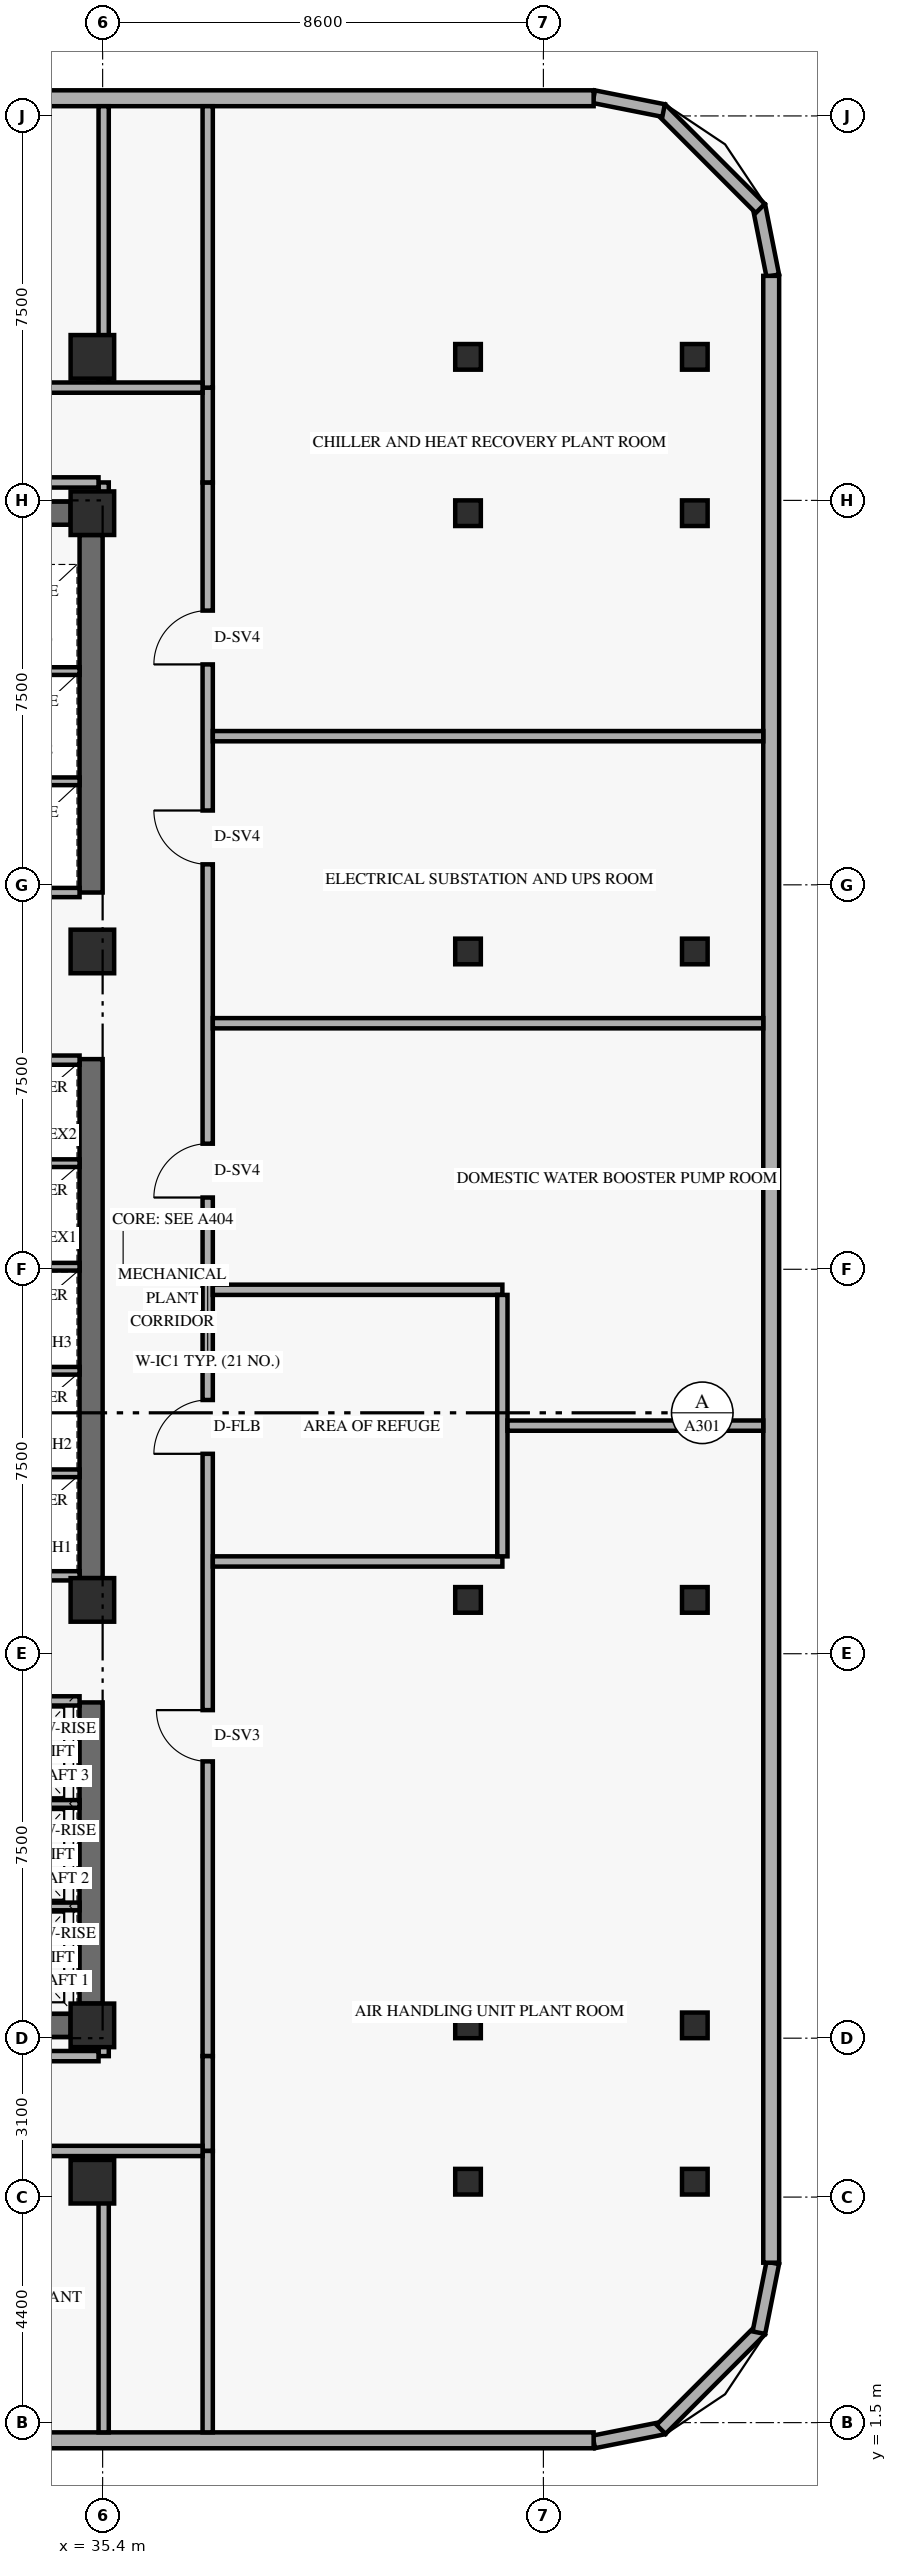
"""IFC4 building model, lengths in metres.
Left out: names, types, materials, properties, quantities, classifications, styles, units other than length and angle.
Written with IfcOpenShell. Run it as: python <this file> out.ifc"""

import sys

from ifc_helpers import new_model, si_unit, direction, frame, frame_2d, origin, origin_2d, place, context, subcontext, project, spatial, rectangle, hollow_rectangle, extrude, element, fill, save


model = new_model("IFC4")
c1 = context("Model", 3, precision=1e-05, world=origin(), true_north=direction((0.0, 1.0)))
c2 = subcontext(c1, "Body", "Model", "MODEL_VIEW")
j1 = project(units=[si_unit("LENGTHUNIT", "METRE"), si_unit("PLANEANGLEUNIT", "RADIAN")], contexts=[c1])
p1 = place(None, origin())
s1 = spatial("IfcSite", under=j1, at=p1, CompositionType="ELEMENT")
p2 = place(p1, origin())
s2 = spatial("IfcBuilding", under=s1, at=p2, CompositionType="ELEMENT")
p3 = place(p2, frame((0.0, 0.0, 71.4)))
s3 = spatial("IfcBuildingStorey", under=s2, at=p3, CompositionType="ELEMENT", Elevation=71.4)
p4 = place(p3, frame((35.175, 9.675, 0.0), z_axis=(0.0, 0.0, 1.0), x_axis=(0.0, 1.0, 0.0)))
e1 = element("IfcWall", 1, at=p4, inside=s3, PredefinedType="SHEAR", context=c2, shape_type="SweptSolid", body=[
    extrude(rectangle(XDim=5.875, YDim=0.45, at=frame_2d((2.938, 0.0))), origin(), (0.0, 0.0, 1.0), 4.297),
])
p5 = place(p3, frame((35.175, 17.975, 0.0), z_axis=(0.0, 0.0, 1.0), x_axis=(0.0, 1.0, 0.0)))
e2 = element("IfcWall", 2, at=p5, inside=s3, PredefinedType="SHEAR", context=c2, shape_type="SweptSolid", body=[
    extrude(rectangle(XDim=10.125, YDim=0.45, at=frame_2d((5.062, 0.0))), origin(), (0.0, 0.0, 1.0), 4.297),
])
p6 = place(p3, frame((35.175, 31.35, 0.0), z_axis=(0.0, 0.0, 1.0), x_axis=(0.0, 1.0, 0.0)))
e3 = element("IfcWall", 3, at=p6, inside=s3, PredefinedType="SHEAR", context=c2, shape_type="SweptSolid", body=[
    extrude(rectangle(XDim=6.975, YDim=0.45, at=frame_2d((3.487, 0.0))), origin(), (0.0, 0.0, 1.0), 4.297),
])
for number, where, z_axis, x_axis in (
    (4, (24.625, 9.25, 0.0), (0.0, 0.0, 1.0), (1.0, 0.0, 0.0)),
    (5, (24.625, 38.75, 0.0), (0.0, 0.0, 1.0), (1.0, 0.0, 0.0)),
):
    element("IfcWall", number, at=place(p3, frame(where, z_axis=z_axis, x_axis=x_axis)), inside=s3, PredefinedType="SHEAR", context=c2, shape_type="SweptSolid", body=[
        extrude(rectangle(XDim=10.15, YDim=0.45, at=frame_2d((5.075, 0.0))), origin(), (0.0, 0.0, 1.0), 4.99),
    ])
for number, where, z_axis, x_axis in (
    (6, (35.2, 6.2, 0.0), (0.0, 0.0, 1.0), (1.0, 0.0, 0.0)),
    (7, (35.2, 9.25, 0.0), (0.0, 0.0, 1.0), (1.0, 0.0, 0.0)),
    (8, (35.2, 17.55, 0.0), (0.0, 0.0, 1.0), (1.0, 0.0, 0.0)),
    (9, (35.2, 30.2, 0.0), (0.0, 0.0, 1.0), (1.0, 0.0, 0.0)),
    (10, (35.2, 38.75, 0.0), (0.0, 0.0, 1.0), (1.0, 0.0, 0.0)),
    (11, (35.2, 41.8, 0.0), (0.0, 0.0, 1.0), (1.0, 0.0, 0.0)),
):
    element("IfcColumn", number, at=place(p3, frame(where, z_axis=z_axis, x_axis=x_axis)), inside=s3, PredefinedType="COLUMN", context=c2, shape_type="SweptSolid", body=[
        extrude(rectangle(XDim=0.85, YDim=0.85, at=origin_2d()), origin(), (0.0, 0.0, 1.0), 5.4),
    ])
for number, where, z_axis, x_axis in (
    (12, (42.435, 6.2, 0.0), (0.035, 0.0, 0.999), (0.0, 1.0, 0.0)),
    (13, (42.435, 9.25, 0.0), (0.035, 0.0, 0.999), (0.0, 1.0, 0.0)),
    (14, (42.435, 17.55, 0.0), (0.035, 0.0, 0.999), (0.0, 1.0, 0.0)),
    (15, (42.435, 30.2, 0.0), (0.035, 0.0, 0.999), (0.0, 1.0, 0.0)),
    (16, (42.435, 38.75, 0.0), (0.035, 0.0, 0.999), (0.0, 1.0, 0.0)),
    (17, (42.435, 41.8, 0.0), (0.035, 0.0, 0.999), (0.0, 1.0, 0.0)),
):
    element("IfcColumn", number, at=place(p3, frame(where, z_axis=z_axis, x_axis=x_axis)), inside=s3, PredefinedType="COLUMN", context=c2, shape_type="SweptSolid", body=[
        extrude(hollow_rectangle(XDim=0.5, YDim=0.5, WallThickness=0.022, at=origin_2d()), origin(), (0.0, 0.0, 1.0), 5.404),
    ])
for number, where, z_axis, x_axis in (
    (18, (46.798, 6.2, 0.0), (0.058, 0.0, 0.998), (0.0, 1.0, 0.0)),
    (19, (46.798, 9.25, 0.0), (0.058, 0.0, 0.998), (0.0, 1.0, 0.0)),
    (20, (46.798, 17.55, 0.0), (0.058, 0.0, 0.998), (0.0, 1.0, 0.0)),
    (21, (46.798, 30.2, 0.0), (0.058, 0.0, 0.998), (0.0, 1.0, 0.0)),
    (22, (46.798, 38.75, 0.0), (0.058, 0.0, 0.998), (0.0, 1.0, 0.0)),
    (23, (46.798, 41.8, 0.0), (0.058, 0.0, 0.998), (0.0, 1.0, 0.0)),
):
    element("IfcColumn", number, at=place(p3, frame(where, z_axis=z_axis, x_axis=x_axis)), inside=s3, PredefinedType="COLUMN", context=c2, shape_type="SweptSolid", body=[
        extrude(hollow_rectangle(XDim=0.5, YDim=0.5, WallThickness=0.022, at=origin_2d()), origin(), (0.0, 0.0, 1.0), 5.409),
    ])
p7 = place(p3, frame((44.983, 1.124, 0.0), z_axis=(0.0, 0.0, 1.0), x_axis=(0.980809899341, 0.19496651342, 0.0)))
e24 = element("IfcWall", 24, at=p7, inside=s3, PredefinedType="SOLIDWALL", context=c2, shape_type="SweptSolid", body=[
    extrude(rectangle(XDim=1.389, YDim=0.25, at=frame_2d((0.694, 0.0))), origin(), (0.0, 0.0, 1.0), 4.99),
])
p8 = place(p3, frame((46.295, 1.368, 0.0), z_axis=(0.0, 0.0, 1.0), x_axis=(0.707106781187, 0.707106781187, 0.0)))
e25 = element("IfcWall", 25, at=p8, inside=s3, PredefinedType="SOLIDWALL", context=c2, shape_type="SweptSolid", body=[
    extrude(rectangle(XDim=2.739, YDim=0.25, at=frame_2d((1.37, 0.0))), origin(), (0.0, 0.0, 1.0), 4.99),
])
for number, where, z_axis, x_axis in (
    (26, (48.205, 3.254, 0.0), (0.0, 0.0, 1.0), (0.195, 0.981, 0.0)),
    (27, (48.476, 43.384, 0.0), (0.0, 0.0, 1.0), (-0.195, 0.981, 0.0)),
):
    element("IfcWall", number, at=place(p3, frame(where, z_axis=z_axis, x_axis=x_axis)), inside=s3, PredefinedType="SOLIDWALL", context=c2, shape_type="SweptSolid", body=[
        extrude(rectangle(XDim=1.389, YDim=0.25, at=frame_2d((0.694, 0.0))), origin(), (0.0, 0.0, 1.0), 4.99),
    ])
p9 = place(p3, frame((48.232, 44.695, 0.0), z_axis=(0.0, 0.0, 1.0), x_axis=(-0.707106781187, 0.707106781187, 0.0)))
e28 = element("IfcWall", 28, at=p9, inside=s3, PredefinedType="SOLIDWALL", context=c2, shape_type="SweptSolid", body=[
    extrude(rectangle(XDim=2.739, YDim=0.25, at=frame_2d((1.37, 0.0))), origin(), (0.0, 0.0, 1.0), 4.99),
])
p10 = place(p3, frame((46.345, 46.605, 0.0), z_axis=(0.0, 0.0, 1.0), x_axis=(-0.980809899341, 0.19496651342, 0.0)))
e29 = element("IfcWall", 29, at=p10, inside=s3, PredefinedType="SOLIDWALL", context=c2, shape_type="SweptSolid", body=[
    extrude(rectangle(XDim=1.389, YDim=0.25, at=frame_2d((0.694, 0.0))), origin(), (0.0, 0.0, 1.0), 4.99),
])
p11 = place(p3, frame((5.42, 1.155, 0.0), z_axis=(0.0, 0.0, 1.0), x_axis=(1.0, 0.0, 0.0)))
e30 = element("IfcWall", 30, at=p11, inside=s3, PredefinedType="SOLIDWALL", context=c2, shape_type="SweptSolid", body=[
    extrude(rectangle(XDim=39.56, YDim=0.31, at=frame_2d((19.78, 0.0))), origin(), (0.0, 0.0, 1.0), 4.99),
])
p12 = place(p3, frame((48.445, 4.62, 0.0), z_axis=(0.0, 0.0, 1.0), x_axis=(0.0, 1.0, 0.0)))
e31 = element("IfcWall", 31, at=p12, inside=s3, PredefinedType="SOLIDWALL", context=c2, shape_type="SweptSolid", body=[
    extrude(rectangle(XDim=38.76, YDim=0.31, at=frame_2d((19.38, 0.0))), origin(), (0.0, 0.0, 1.0), 4.99),
])
p13 = place(p3, frame((44.98, 46.845, 0.0), z_axis=(0.0, 0.0, 1.0), x_axis=(-1.0, 0.0, 0.0)))
e32 = element("IfcWall", 32, at=p13, inside=s3, PredefinedType="SOLIDWALL", context=c2, shape_type="SweptSolid", body=[
    extrude(rectangle(XDim=39.56, YDim=0.31, at=frame_2d((19.78, 0.0))), origin(), (0.0, 0.0, 1.0), 4.99),
])
p14 = place(p3, frame((32.74, 15.58, 0.0), z_axis=(0.0, 0.0, 1.0), x_axis=(1.0, 0.0, 0.0)))
e33 = element("IfcWall", 33, at=p14, inside=s3, PredefinedType="STANDARD", context=c2, shape_type="SweptSolid", body=[
    extrude(rectangle(XDim=2.21, YDim=0.18, at=frame_2d((1.105, 0.0))), origin(), (0.0, 0.0, 1.0), 4.99),
])
for number, where, z_axis, x_axis in (
    (34, (32.74, 11.57, 0.0), (0.0, 0.0, 1.0), (1.0, 0.0, 0.0)),
    (35, (32.74, 13.57, 0.0), (0.0, 0.0, 1.0), (1.0, 0.0, 0.0)),
):
    element("IfcWall", number, at=place(p3, frame(where, z_axis=z_axis, x_axis=x_axis)), inside=s3, PredefinedType="STANDARD", context=c2, shape_type="SweptSolid", body=[
        extrude(rectangle(XDim=2.21, YDim=0.15, at=frame_2d((1.105, 0.0))), origin(), (0.0, 0.0, 1.0), 4.99),
    ])
for number, where, z_axis, x_axis in (
    (36, (32.74, 18.02, 0.0), (0.0, 0.0, 1.0), (1.0, 0.0, 0.0)),
    (37, (32.74, 28.08, 0.0), (0.0, 0.0, 1.0), (1.0, 0.0, 0.0)),
):
    element("IfcWall", number, at=place(p3, frame(where, z_axis=z_axis, x_axis=x_axis)), inside=s3, PredefinedType="STANDARD", context=c2, shape_type="SweptSolid", body=[
        extrude(rectangle(XDim=2.21, YDim=0.18, at=frame_2d((1.105, 0.0))), origin(), (0.0, 0.0, 1.0), 4.99),
    ])
for number, where, z_axis, x_axis in (
    (38, (32.74, 20.02, 0.0), (0.0, 0.0, 1.0), (1.0, 0.0, 0.0)),
    (39, (32.74, 22.02, 0.0), (0.0, 0.0, 1.0), (1.0, 0.0, 0.0)),
    (40, (32.74, 24.05, 0.0), (0.0, 0.0, 1.0), (1.0, 0.0, 0.0)),
    (41, (32.74, 26.07, 0.0), (0.0, 0.0, 1.0), (1.0, 0.0, 0.0)),
):
    element("IfcWall", number, at=place(p3, frame(where, z_axis=z_axis, x_axis=x_axis)), inside=s3, PredefinedType="STANDARD", context=c2, shape_type="SweptSolid", body=[
        extrude(rectangle(XDim=2.21, YDim=0.15, at=frame_2d((1.105, 0.0))), origin(), (0.0, 0.0, 1.0), 4.99),
    ])
p15 = place(p3, frame((32.74, 31.35, 0.0), z_axis=(0.0, 0.0, 1.0), x_axis=(1.0, 0.0, 0.0)))
e42 = element("IfcWall", 42, at=p15, inside=s3, PredefinedType="STANDARD", context=c2, shape_type="SweptSolid", body=[
    extrude(rectangle(XDim=2.21, YDim=0.18, at=frame_2d((1.105, 0.0))), origin(), (0.0, 0.0, 1.0), 4.99),
])
for number, where, z_axis, x_axis in (
    (43, (32.74, 33.52, 0.0), (0.0, 0.0, 1.0), (1.0, 0.0, 0.0)),
    (44, (32.74, 35.67, 0.0), (0.0, 0.0, 1.0), (1.0, 0.0, 0.0)),
):
    element("IfcWall", number, at=place(p3, frame(where, z_axis=z_axis, x_axis=x_axis)), inside=s3, PredefinedType="STANDARD", context=c2, shape_type="SweptSolid", body=[
        extrude(rectangle(XDim=2.21, YDim=0.15, at=frame_2d((1.105, 0.0))), origin(), (0.0, 0.0, 1.0), 4.99),
    ])
p16 = place(p3, frame((37.45, 8.65, 0.0), z_axis=(0.0, 0.0, 1.0), x_axis=(0.0, 1.0, 0.0)))
e45 = element("IfcWall", 45, at=p16, inside=s3, PredefinedType="STANDARD", context=c2, shape_type="SweptSolid", body=[
    extrude(rectangle(XDim=30.7, YDim=0.2, at=frame_2d((15.35, 0.0))), origin(), (0.0, 0.0, 1.0), 4.279),
])
p17 = place(p16, frame((11.75, 0.0, 0.0)))
e46 = element("IfcOpeningElement", 46, at=p17, cuts=e45, PredefinedType="OPENING", context=c2, shape_type="SweptSolid", body=[
    extrude(rectangle(XDim=1.05, YDim=2.15, at=frame_2d((0.525, 1.075))), frame((0.0, 0.11, 0.0), z_axis=(0.0, -1.0, 0.0), x_axis=(1.0, 0.0, 0.0)), (0.0, 0.0, 1.0), 0.22),
])
p18 = place(p16, frame((5.75, 0.0, 0.0)))
e47 = element("IfcOpeningElement", 47, at=p18, cuts=e45, PredefinedType="OPENING", context=c2, shape_type="SweptSolid", body=[
    extrude(rectangle(XDim=1.0, YDim=2.15, at=frame_2d((0.5, 1.075))), frame((0.0, 0.11, 0.0), z_axis=(0.0, -1.0, 0.0), x_axis=(1.0, 0.0, 0.0)), (0.0, 0.0, 1.0), 0.22),
])
p19 = place(p16, frame((16.75, 0.0, 0.0)))
e48 = element("IfcOpeningElement", 48, at=p19, cuts=e45, PredefinedType="OPENING", context=c2, shape_type="SweptSolid", body=[
    extrude(rectangle(XDim=1.05, YDim=2.15, at=frame_2d((0.525, 1.075))), frame((0.0, 0.11, 0.0), z_axis=(0.0, -1.0, 0.0), x_axis=(1.0, 0.0, 0.0)), (0.0, 0.0, 1.0), 0.22),
])
p20 = place(p16, frame((23.25, 0.0, 0.0)))
e49 = element("IfcOpeningElement", 49, at=p20, cuts=e45, PredefinedType="OPENING", context=c2, shape_type="SweptSolid", body=[
    extrude(rectangle(XDim=1.05, YDim=2.15, at=frame_2d((0.525, 1.075))), frame((0.0, 0.11, 0.0), z_axis=(0.0, -1.0, 0.0), x_axis=(1.0, 0.0, 0.0)), (0.0, 0.0, 1.0), 0.22),
])
p21 = place(p16, frame((27.15, 0.0, 0.0)))
e50 = element("IfcOpeningElement", 50, at=p21, cuts=e45, PredefinedType="OPENING", context=c2, shape_type="SweptSolid", body=[
    extrude(rectangle(XDim=1.05, YDim=2.15, at=frame_2d((0.525, 1.075))), frame((0.0, 0.11, 0.0), z_axis=(0.0, -1.0, 0.0), x_axis=(1.0, 0.0, 0.0)), (0.0, 0.0, 1.0), 0.22),
])
for number, where, z_axis, x_axis in (
    (51, (37.45, 6.8, 0.0), (0.0, 0.0, 1.0), (0.0, 1.0, 0.0)),
    (52, (37.45, 39.35, 0.0), (0.0, 0.0, 1.0), (0.0, 1.0, 0.0)),
):
    element("IfcWall", number, at=place(p3, frame(where, z_axis=z_axis, x_axis=x_axis)), inside=s3, PredefinedType="STANDARD", context=c2, shape_type="SweptSolid", body=[
        extrude(rectangle(XDim=1.85, YDim=0.2, at=frame_2d((0.925, 0.0))), origin(), (0.0, 0.0, 1.0), 4.99),
    ])
for number, where, z_axis, x_axis in (
    (53, (37.45, 1.31, 0.0), (0.0, 0.0, 1.0), (0.0, 1.0, 0.0)),
    (54, (37.45, 41.2, 0.0), (0.0, 0.0, 1.0), (0.0, 1.0, 0.0)),
):
    element("IfcWall", number, at=place(p3, frame(where, z_axis=z_axis, x_axis=x_axis)), inside=s3, PredefinedType="STANDARD", context=c2, shape_type="SweptSolid", body=[
        extrude(rectangle(XDim=5.49, YDim=0.2, at=frame_2d((2.745, 0.0))), origin(), (0.0, 0.0, 1.0), 4.439),
    ])
p22 = place(p3, frame((35.42, 1.31, 0.0), z_axis=(0.0, 0.0, 1.0), x_axis=(0.0, 1.0, 0.0)))
e55 = element("IfcWall", 55, at=p22, inside=s3, PredefinedType="STANDARD", context=c2, shape_type="SweptSolid", body=[
    extrude(rectangle(XDim=5.49, YDim=0.2, at=frame_2d((2.745, 0.0))), origin(), (0.0, 0.0, 1.0), 4.279),
])
for number, where, z_axis, x_axis in (
    (56, (35.42, 8.65, 0.0), (0.0, 0.0, 1.0), (0.0, 1.0, 0.0)),
    (57, (35.42, 38.75, 0.0), (0.0, 0.0, 1.0), (0.0, 1.0, 0.0)),
):
    element("IfcWall", number, at=place(p3, frame(where, z_axis=z_axis, x_axis=x_axis)), inside=s3, PredefinedType="STANDARD", context=c2, shape_type="SweptSolid", body=[
        extrude(rectangle(XDim=0.6, YDim=0.2, at=frame_2d((0.3, 0.0))), origin(), (0.0, 0.0, 1.0), 4.279),
    ])
p23 = place(p3, frame((35.42, 41.2, 0.0), z_axis=(0.0, 0.0, 1.0), x_axis=(0.0, 1.0, 0.0)))
e58 = element("IfcWall", 58, at=p23, inside=s3, PredefinedType="STANDARD", context=c2, shape_type="SweptSolid", body=[
    extrude(rectangle(XDim=5.49, YDim=0.2, at=frame_2d((2.745, 0.0))), origin(), (0.0, 0.0, 1.0), 4.279),
])
for number, where, z_axis, x_axis in (
    (59, (37.55, 18.3, 0.0), (0.0, 0.0, 1.0), (1.0, 0.0, 0.0)),
    (60, (37.55, 23.6, 0.0), (0.0, 0.0, 1.0), (1.0, 0.0, 0.0)),
):
    element("IfcWall", number, at=place(p3, frame(where, z_axis=z_axis, x_axis=x_axis)), inside=s3, PredefinedType="STANDARD", context=c2, shape_type="SweptSolid", body=[
        extrude(rectangle(XDim=5.65, YDim=0.2, at=frame_2d((2.825, 0.0))), origin(), (0.0, 0.0, 1.0), 4.279),
    ])
p24 = place(p3, frame((43.2, 18.4, 0.0), z_axis=(0.0, 0.0, 1.0), x_axis=(0.0, 1.0, 0.0)))
e61 = element("IfcWall", 61, at=p24, inside=s3, PredefinedType="STANDARD", context=c2, shape_type="SweptSolid", body=[
    extrude(rectangle(XDim=5.1, YDim=0.2, at=frame_2d((2.55, 0.0))), origin(), (0.0, 0.0, 1.0), 4.99),
])
p25 = place(p3, frame((43.3, 20.95, 0.0), z_axis=(0.0, 0.0, 1.0), x_axis=(1.0, 0.0, 0.0)))
e62 = element("IfcWall", 62, at=p25, inside=s3, PredefinedType="STANDARD", context=c2, shape_type="SweptSolid", body=[
    extrude(rectangle(XDim=4.99, YDim=0.2, at=frame_2d((2.495, 0.0))), origin(), (0.0, 0.0, 1.0), 4.439),
])
for number, where, z_axis, x_axis in (
    (63, (37.55, 28.8, 0.0), (0.0, 0.0, 1.0), (1.0, 0.0, 0.0)),
    (64, (37.55, 34.4, 0.0), (0.0, 0.0, 1.0), (1.0, 0.0, 0.0)),
):
    element("IfcWall", number, at=place(p3, frame(where, z_axis=z_axis, x_axis=x_axis)), inside=s3, PredefinedType="STANDARD", context=c2, shape_type="SweptSolid", body=[
        extrude(rectangle(XDim=10.74, YDim=0.2, at=frame_2d((5.37, 0.0))), origin(), (0.0, 0.0, 1.0), 4.279),
    ])
p26 = place(p3, frame((21.75, 6.8, 0.0), z_axis=(0.0, 0.0, 1.0), x_axis=(1.0, 0.0, 0.0)))
e65 = element("IfcWall", 65, at=p26, inside=s3, PredefinedType="STANDARD", context=c2, shape_type="SweptSolid", body=[
    extrude(rectangle(XDim=15.6, YDim=0.2, at=frame_2d((7.8, 0.0))), origin(), (0.0, 0.0, 1.0), 4.279),
])
p27 = place(p26, frame((5.1, 0.0, 0.0)))
e66 = element("IfcOpeningElement", 66, at=p27, cuts=e65, PredefinedType="OPENING", context=c2, shape_type="SweptSolid", body=[
    extrude(rectangle(XDim=0.9, YDim=2.1, at=frame_2d((0.45, 1.05))), frame((0.0, 0.11, 0.0), z_axis=(0.0, -1.0, 0.0), x_axis=(1.0, 0.0, 0.0)), (0.0, 0.0, 1.0), 0.22),
])
p28 = place(p3, frame((21.75, 41.2, 0.0), z_axis=(0.0, 0.0, 1.0), x_axis=(1.0, 0.0, 0.0)))
e67 = element("IfcWall", 67, at=p28, inside=s3, PredefinedType="STANDARD", context=c2, shape_type="SweptSolid", body=[
    extrude(rectangle(XDim=15.6, YDim=0.2, at=frame_2d((7.8, 0.0))), origin(), (0.0, 0.0, 1.0), 4.279),
])
p29 = place(p28, frame((5.1, 0.0, 0.0)))
e68 = element("IfcOpeningElement", 68, at=p29, cuts=e67, PredefinedType="OPENING", context=c2, shape_type="SweptSolid", body=[
    extrude(rectangle(XDim=0.9, YDim=2.1, at=frame_2d((0.45, 1.05))), frame((0.0, 0.11, 0.0), z_axis=(0.0, -1.0, 0.0), x_axis=(1.0, 0.0, 0.0)), (0.0, 0.0, 1.0), 0.22),
])
for number, where, z_axis, x_axis in (
    (69, (23.85, 39.35, 0.0), (0.0, 0.0, 1.0), (1.0, 0.0, 0.0)),
    (70, (23.85, 8.65, 0.0), (0.0, 0.0, 1.0), (1.0, 0.0, 0.0)),
):
    element("IfcWall", number, at=place(p3, frame(where, z_axis=z_axis, x_axis=x_axis)), inside=s3, PredefinedType="STANDARD", context=c2, shape_type="SweptSolid", body=[
        extrude(rectangle(XDim=11.47, YDim=0.2, at=frame_2d((5.735, 0.0))), origin(), (0.0, 0.0, 1.0), 4.279),
    ])
p30 = place(p17, origin())
e71 = element("IfcDoor", 71, at=p30, inside=s3, OperationType="SINGLE_SWING_LEFT", PredefinedType="DOOR", context=c2, shape_type="SweptSolid", body=[
    extrude(rectangle(XDim=1.05, YDim=2.15, at=frame_2d((0.525, 1.075))), frame((0.0, 0.025, 0.0), z_axis=(0.0, -1.0, 0.0), x_axis=(1.0, 0.0, 0.0)), (0.0, 0.0, 1.0), 0.05),
])
fill(e46, e71)
p31 = place(p18, origin())
e72 = element("IfcDoor", 72, at=p31, inside=s3, OperationType="SINGLE_SWING_RIGHT", PredefinedType="DOOR", context=c2, shape_type="SweptSolid", body=[
    extrude(rectangle(XDim=1.0, YDim=2.15, at=frame_2d((0.5, 1.075))), frame((0.0, 0.025, 0.0), z_axis=(0.0, -1.0, 0.0), x_axis=(1.0, 0.0, 0.0)), (0.0, 0.0, 1.0), 0.05),
])
fill(e47, e72)
p32 = place(p19, origin())
e73 = element("IfcDoor", 73, at=p32, inside=s3, OperationType="SINGLE_SWING_LEFT", PredefinedType="DOOR", context=c2, shape_type="SweptSolid", body=[
    extrude(rectangle(XDim=1.05, YDim=2.15, at=frame_2d((0.525, 1.075))), frame((0.0, 0.025, 0.0), z_axis=(0.0, -1.0, 0.0), x_axis=(1.0, 0.0, 0.0)), (0.0, 0.0, 1.0), 0.05),
])
fill(e48, e73)
p33 = place(p20, origin())
e74 = element("IfcDoor", 74, at=p33, inside=s3, OperationType="SINGLE_SWING_RIGHT", PredefinedType="DOOR", context=c2, shape_type="SweptSolid", body=[
    extrude(rectangle(XDim=1.05, YDim=2.15, at=frame_2d((0.525, 1.075))), frame((0.0, 0.025, 0.0), z_axis=(0.0, -1.0, 0.0), x_axis=(1.0, 0.0, 0.0)), (0.0, 0.0, 1.0), 0.05),
])
fill(e49, e74)
p34 = place(p21, origin())
e75 = element("IfcDoor", 75, at=p34, inside=s3, OperationType="SINGLE_SWING_LEFT", PredefinedType="DOOR", context=c2, shape_type="SweptSolid", body=[
    extrude(rectangle(XDim=1.05, YDim=2.15, at=frame_2d((0.525, 1.075))), frame((0.0, 0.025, 0.0), z_axis=(0.0, -1.0, 0.0), x_axis=(1.0, 0.0, 0.0)), (0.0, 0.0, 1.0), 0.05),
])
fill(e50, e75)
save(model, sys.argv[1])
